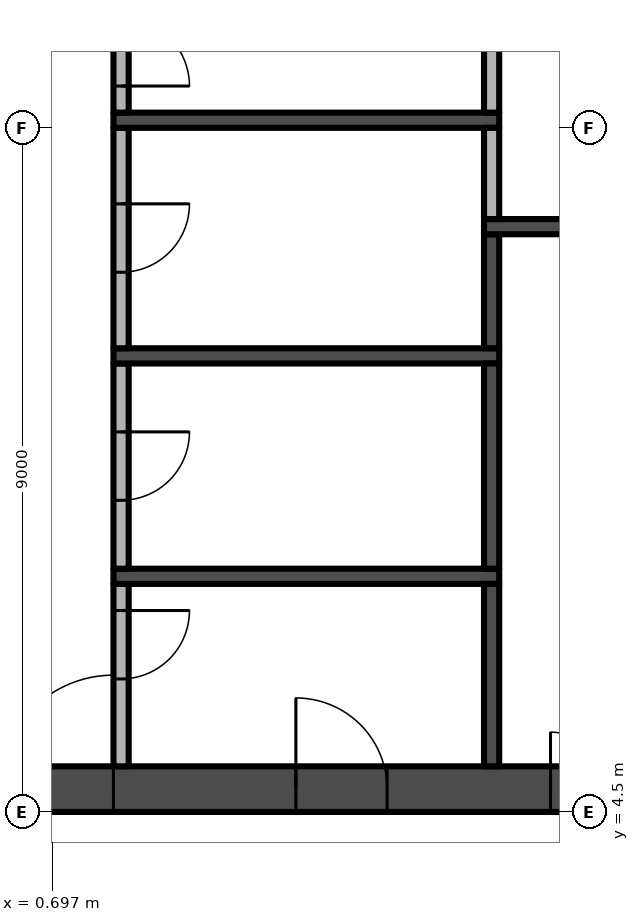
"""IFC4 building model, lengths in metres.
Left out: names, types, materials, properties, quantities, classifications, styles, units other than length and angle.
Written with IfcOpenShell. Run it as: python <this file> out.ifc"""

import sys

from ifc_helpers import new_model, si_unit, direction, frame, frame_2d, origin, place, context, subcontext, project, spatial, rectangle, extrude, element, fill, save


model = new_model("IFC4")
c1 = context("Model", 3, precision=1e-05, world=origin(), true_north=direction((0.0, 1.0)))
c2 = subcontext(c1, "Body", "Model", "MODEL_VIEW")
j1 = project(units=[si_unit("LENGTHUNIT", "METRE"), si_unit("PLANEANGLEUNIT", "RADIAN")], contexts=[c1])
p1 = place(None, origin())
s1 = spatial("IfcSite", under=j1, at=p1, CompositionType="ELEMENT")
p2 = place(p1, origin())
s2 = spatial("IfcBuilding", under=s1, at=p2, CompositionType="ELEMENT")
p3 = place(p2, frame((0.0, 0.0, 297.4)))
s3 = spatial("IfcBuildingStorey", under=s2, at=p3, CompositionType="ELEMENT", Elevation=297.4)
p4 = place(p3, frame((-13.5, 4.8, -0.3), z_axis=(0.0, 0.0, 1.0), x_axis=(1.0, 0.0, 0.0)))
e1 = element("IfcWall", 1, at=p4, inside=s3, PredefinedType="SHEAR", context=c2, shape_type="SweptSolid", body=[
    extrude(rectangle(XDim=27.0, YDim=0.6, at=frame_2d((13.5, 0.0))), origin(), (0.0, 0.0, 1.0), 5.95),
])
p5 = place(p4, frame((12.0, 0.0, 0.3)))
e2 = element("IfcOpeningElement", 2, at=p5, cuts=e1, PredefinedType="OPENING", context=c2, shape_type="SweptSolid", body=[
    extrude(rectangle(XDim=3.0, YDim=2.4, at=frame_2d((1.5, 1.2))), frame((0.0, 0.31, 0.0), z_axis=(0.0, -1.0, 0.0), x_axis=(1.0, 0.0, 0.0)), (0.0, 0.0, 1.0), 0.62),
])
p6 = place(p4, frame((4.9, 0.0, 0.3)))
e3 = element("IfcOpeningElement", 3, at=p6, cuts=e1, PredefinedType="OPENING", context=c2, shape_type="SweptSolid", body=[
    extrude(rectangle(XDim=1.2, YDim=2.2, at=frame_2d((0.6, 1.1))), frame((0.0, 0.31, 0.0), z_axis=(0.0, -1.0, 0.0), x_axis=(1.0, 0.0, 0.0)), (0.0, 0.0, 1.0), 0.62),
])
p7 = place(p4, frame((20.75, 0.0, 0.3)))
e4 = element("IfcOpeningElement", 4, at=p7, cuts=e1, PredefinedType="OPENING", context=c2, shape_type="SweptSolid", body=[
    extrude(rectangle(XDim=1.5, YDim=2.2, at=frame_2d((0.75, 1.1))), frame((0.0, 0.31, 0.0), z_axis=(0.0, -1.0, 0.0), x_axis=(1.0, 0.0, 0.0)), (0.0, 0.0, 1.0), 0.62),
])
p8 = place(p4, frame((17.4, 0.0, 0.3)))
e5 = element("IfcOpeningElement", 5, at=p8, cuts=e1, PredefinedType="OPENING", context=c2, shape_type="SweptSolid", body=[
    extrude(rectangle(XDim=1.2, YDim=2.2, at=frame_2d((0.6, 1.1))), frame((0.0, 0.31, 0.0), z_axis=(0.0, -1.0, 0.0), x_axis=(1.0, 0.0, 0.0)), (0.0, 0.0, 1.0), 0.62),
])
p9 = place(p3, frame((1.6, 7.5, 0.0), z_axis=(0.0, 0.0, 1.0), x_axis=(0.0, -1.0, 0.0)))
e6 = element("IfcWall", 6, at=p9, inside=s3, PredefinedType="PARTITIONING", context=c2, shape_type="SweptSolid", body=[
    extrude(rectangle(XDim=2.4, YDim=0.2, at=frame_2d((1.2, 0.0))), origin(), (0.0, 0.0, 1.0), 5.65),
])
p10 = place(p9, frame((0.35, 0.0, 0.0)))
e7 = element("IfcOpeningElement", 7, at=p10, cuts=e6, PredefinedType="OPENING", context=c2, shape_type="SweptSolid", body=[
    extrude(rectangle(XDim=0.9, YDim=2.1, at=frame_2d((0.45, 1.05))), frame((0.0, 0.11, 0.0), z_axis=(0.0, -1.0, 0.0), x_axis=(1.0, 0.0, 0.0)), (0.0, 0.0, 1.0), 0.22),
])
p11 = place(p3, frame((1.5, 7.6, 0.0), z_axis=(0.0, 0.0, 1.0), x_axis=(1.0, 0.0, 0.0)))
e8 = element("IfcWall", 8, at=p11, inside=s3, PredefinedType="SHEAR", context=c2, shape_type="SweptSolid", body=[
    extrude(rectangle(XDim=5.075, YDim=0.2, at=frame_2d((2.538, 0.0))), origin(), (0.0, 0.0, 1.0), 5.65),
])
p12 = place(p3, frame((1.6, 10.4, 0.0), z_axis=(0.0, 0.0, 1.0), x_axis=(0.0, -1.0, 0.0)))
e9 = element("IfcWall", 9, at=p12, inside=s3, PredefinedType="PARTITIONING", context=c2, shape_type="SweptSolid", body=[
    extrude(rectangle(XDim=2.7, YDim=0.2, at=frame_2d((1.35, 0.0))), origin(), (0.0, 0.0, 1.0), 5.65),
])
p13 = place(p12, frame((0.9, 0.0, 0.0)))
e10 = element("IfcOpeningElement", 10, at=p13, cuts=e9, PredefinedType="OPENING", context=c2, shape_type="SweptSolid", body=[
    extrude(rectangle(XDim=0.9, YDim=2.1, at=frame_2d((0.45, 1.05))), frame((0.0, 0.11, 0.0), z_axis=(0.0, -1.0, 0.0), x_axis=(1.0, 0.0, 0.0)), (0.0, 0.0, 1.0), 0.22),
])
p14 = place(p3, frame((1.5, 10.5, 0.0), z_axis=(0.0, 0.0, 1.0), x_axis=(1.0, 0.0, 0.0)))
e11 = element("IfcWall", 11, at=p14, inside=s3, PredefinedType="SHEAR", context=c2, shape_type="SweptSolid", body=[
    extrude(rectangle(XDim=5.075, YDim=0.2, at=frame_2d((2.538, 0.0))), origin(), (0.0, 0.0, 1.0), 5.65),
])
p15 = place(p3, frame((1.6, 13.5, 0.0), z_axis=(0.0, 0.0, 1.0), x_axis=(0.0, -1.0, 0.0)))
e12 = element("IfcWall", 12, at=p15, inside=s3, PredefinedType="PARTITIONING", context=c2, shape_type="SweptSolid", body=[
    extrude(rectangle(XDim=2.9, YDim=0.2, at=frame_2d((1.45, 0.0))), origin(), (0.0, 0.0, 1.0), 5.65),
])
p16 = place(p15, frame((1.0, 0.0, 0.0)))
e13 = element("IfcOpeningElement", 13, at=p16, cuts=e12, PredefinedType="OPENING", context=c2, shape_type="SweptSolid", body=[
    extrude(rectangle(XDim=0.9, YDim=2.1, at=frame_2d((0.45, 1.05))), frame((0.0, 0.11, 0.0), z_axis=(0.0, -1.0, 0.0), x_axis=(1.0, 0.0, 0.0)), (0.0, 0.0, 1.0), 0.22),
])
p17 = place(p3, frame((1.5, 13.6, 0.0), z_axis=(0.0, 0.0, 1.0), x_axis=(1.0, 0.0, 0.0)))
e14 = element("IfcWall", 14, at=p17, inside=s3, PredefinedType="SHEAR", context=c2, shape_type="SweptSolid", body=[
    extrude(rectangle(XDim=5.075, YDim=0.2, at=frame_2d((2.538, 0.0))), origin(), (0.0, 0.0, 1.0), 5.65),
])
p18 = place(p3, frame((1.6, 15.9, 0.0), z_axis=(0.0, 0.0, 1.0), x_axis=(0.0, -1.0, 0.0)))
e15 = element("IfcWall", 15, at=p18, inside=s3, PredefinedType="PARTITIONING", context=c2, shape_type="SweptSolid", body=[
    extrude(rectangle(XDim=2.2, YDim=0.2, at=frame_2d((1.1, 0.0))), origin(), (0.0, 0.0, 1.0), 5.65),
])
p19 = place(p18, frame((0.95, 0.0, 0.0)))
e16 = element("IfcOpeningElement", 16, at=p19, cuts=e15, PredefinedType="OPENING", context=c2, shape_type="SweptSolid", body=[
    extrude(rectangle(XDim=0.9, YDim=2.1, at=frame_2d((0.45, 1.05))), frame((0.0, 0.11, 0.0), z_axis=(0.0, -1.0, 0.0), x_axis=(1.0, 0.0, 0.0)), (0.0, 0.0, 1.0), 0.22),
])
p20 = place(p3, frame((6.475, 5.1, 0.0), z_axis=(0.0, 0.0, 1.0), x_axis=(0.0, 1.0, 0.0)))
e17 = element("IfcWall", 17, at=p20, inside=s3, PredefinedType="SHEAR", context=c2, shape_type="SweptSolid", body=[
    extrude(rectangle(XDim=2.4, YDim=0.2, at=frame_2d((1.2, 0.0))), origin(), (0.0, 0.0, 1.0), 5.65),
])
p21 = place(p3, frame((6.475, 7.7, 0.0), z_axis=(0.0, 0.0, 1.0), x_axis=(0.0, 1.0, 0.0)))
e18 = element("IfcWall", 18, at=p21, inside=s3, PredefinedType="SHEAR", context=c2, shape_type="SweptSolid", body=[
    extrude(rectangle(XDim=2.7, YDim=0.2, at=frame_2d((1.35, 0.0))), origin(), (0.0, 0.0, 1.0), 5.65),
])
p22 = place(p3, frame((6.475, 10.6, 0.0), z_axis=(0.0, 0.0, 1.0), x_axis=(0.0, 1.0, 0.0)))
e19 = element("IfcWall", 19, at=p22, inside=s3, PredefinedType="SHEAR", context=c2, shape_type="SweptSolid", body=[
    extrude(rectangle(XDim=1.5, YDim=0.2, at=frame_2d((0.75, 0.0))), origin(), (0.0, 0.0, 1.0), 5.65),
])
p23 = place(p3, frame((6.375, 12.2, 0.0), z_axis=(0.0, 0.0, 1.0), x_axis=(1.0, 0.0, 0.0)))
e20 = element("IfcWall", 20, at=p23, inside=s3, PredefinedType="SHEAR", context=c2, shape_type="SweptSolid", body=[
    extrude(rectangle(XDim=3.475, YDim=0.2, at=frame_2d((1.738, 0.0))), origin(), (0.0, 0.0, 1.0), 5.65),
])
p24 = place(p3, frame((6.475, 12.3, 0.0), z_axis=(0.0, 0.0, 1.0), x_axis=(0.0, 1.0, 0.0)))
e21 = element("IfcWall", 21, at=p24, inside=s3, PredefinedType="PARTITIONING", context=c2, shape_type="SweptSolid", body=[
    extrude(rectangle(XDim=1.2, YDim=0.2, at=frame_2d((0.6, 0.0))), origin(), (0.0, 0.0, 1.0), 5.65),
])
p25 = place(p3, frame((6.475, 13.7, 0.0), z_axis=(0.0, 0.0, 1.0), x_axis=(0.0, 1.0, 0.0)))
e22 = element("IfcWall", 22, at=p25, inside=s3, PredefinedType="PARTITIONING", context=c2, shape_type="SweptSolid", body=[
    extrude(rectangle(XDim=2.2, YDim=0.2, at=frame_2d((1.1, 0.0))), origin(), (0.0, 0.0, 1.0), 5.65),
])
p26 = place(p5, frame((3.0, 0.0, 0.0), z_axis=(0.0, 0.0, 1.0), x_axis=(-1.0, 0.0, 0.0)))
e23 = element("IfcDoor", 23, at=p26, inside=s3, OperationType="DOUBLE_DOOR_SINGLE_SWING", PredefinedType="DOOR", context=c2, shape_type="SweptSolid", body=[
    extrude(rectangle(XDim=3.0, YDim=2.4, at=frame_2d((1.5, 1.2))), frame((0.0, 0.025, 0.0), z_axis=(0.0, -1.0, 0.0), x_axis=(1.0, 0.0, 0.0)), (0.0, 0.0, 1.0), 0.05),
])
fill(e2, e23)
p27 = place(p7, frame((1.5, 0.0, 0.0), z_axis=(0.0, 0.0, 1.0), x_axis=(-1.0, 0.0, 0.0)))
e24 = element("IfcDoor", 24, at=p27, inside=s3, OperationType="DOUBLE_DOOR_SINGLE_SWING", PredefinedType="DOOR", context=c2, shape_type="SweptSolid", body=[
    extrude(rectangle(XDim=1.5, YDim=2.2, at=frame_2d((0.75, 1.1))), frame((0.0, 0.025, 0.0), z_axis=(0.0, -1.0, 0.0), x_axis=(1.0, 0.0, 0.0)), (0.0, 0.0, 1.0), 0.05),
])
fill(e4, e24)
p28 = place(p8, frame((1.2, 0.0, 0.0), z_axis=(0.0, 0.0, 1.0), x_axis=(-1.0, 0.0, 0.0)))
e25 = element("IfcDoor", 25, at=p28, inside=s3, OperationType="SINGLE_SWING_RIGHT", PredefinedType="DOOR", context=c2, shape_type="SweptSolid", body=[
    extrude(rectangle(XDim=1.2, YDim=2.2, at=frame_2d((0.6, 1.1))), frame((0.0, 0.025, 0.0), z_axis=(0.0, -1.0, 0.0), x_axis=(1.0, 0.0, 0.0)), (0.0, 0.0, 1.0), 0.05),
])
fill(e5, e25)
p29 = place(p10, origin())
e26 = element("IfcDoor", 26, at=p29, inside=s3, OperationType="SINGLE_SWING_LEFT", PredefinedType="DOOR", context=c2, shape_type="SweptSolid", body=[
    extrude(rectangle(XDim=0.9, YDim=2.1, at=frame_2d((0.45, 1.05))), frame((0.0, 0.025, 0.0), z_axis=(0.0, -1.0, 0.0), x_axis=(1.0, 0.0, 0.0)), (0.0, 0.0, 1.0), 0.05),
])
fill(e7, e26)
p30 = place(p13, origin())
e27 = element("IfcDoor", 27, at=p30, inside=s3, OperationType="SINGLE_SWING_LEFT", PredefinedType="DOOR", context=c2, shape_type="SweptSolid", body=[
    extrude(rectangle(XDim=0.9, YDim=2.1, at=frame_2d((0.45, 1.05))), frame((0.0, 0.025, 0.0), z_axis=(0.0, -1.0, 0.0), x_axis=(1.0, 0.0, 0.0)), (0.0, 0.0, 1.0), 0.05),
])
fill(e10, e27)
p31 = place(p16, origin())
e28 = element("IfcDoor", 28, at=p31, inside=s3, OperationType="SINGLE_SWING_LEFT", PredefinedType="DOOR", context=c2, shape_type="SweptSolid", body=[
    extrude(rectangle(XDim=0.9, YDim=2.1, at=frame_2d((0.45, 1.05))), frame((0.0, 0.025, 0.0), z_axis=(0.0, -1.0, 0.0), x_axis=(1.0, 0.0, 0.0)), (0.0, 0.0, 1.0), 0.05),
])
fill(e13, e28)
p32 = place(p19, origin())
e29 = element("IfcDoor", 29, at=p32, inside=s3, OperationType="SINGLE_SWING_RIGHT", PredefinedType="DOOR", context=c2, shape_type="SweptSolid", body=[
    extrude(rectangle(XDim=0.9, YDim=2.1, at=frame_2d((0.45, 1.05))), frame((0.0, 0.025, 0.0), z_axis=(0.0, -1.0, 0.0), x_axis=(1.0, 0.0, 0.0)), (0.0, 0.0, 1.0), 0.05),
])
fill(e16, e29)
save(model, sys.argv[1])
